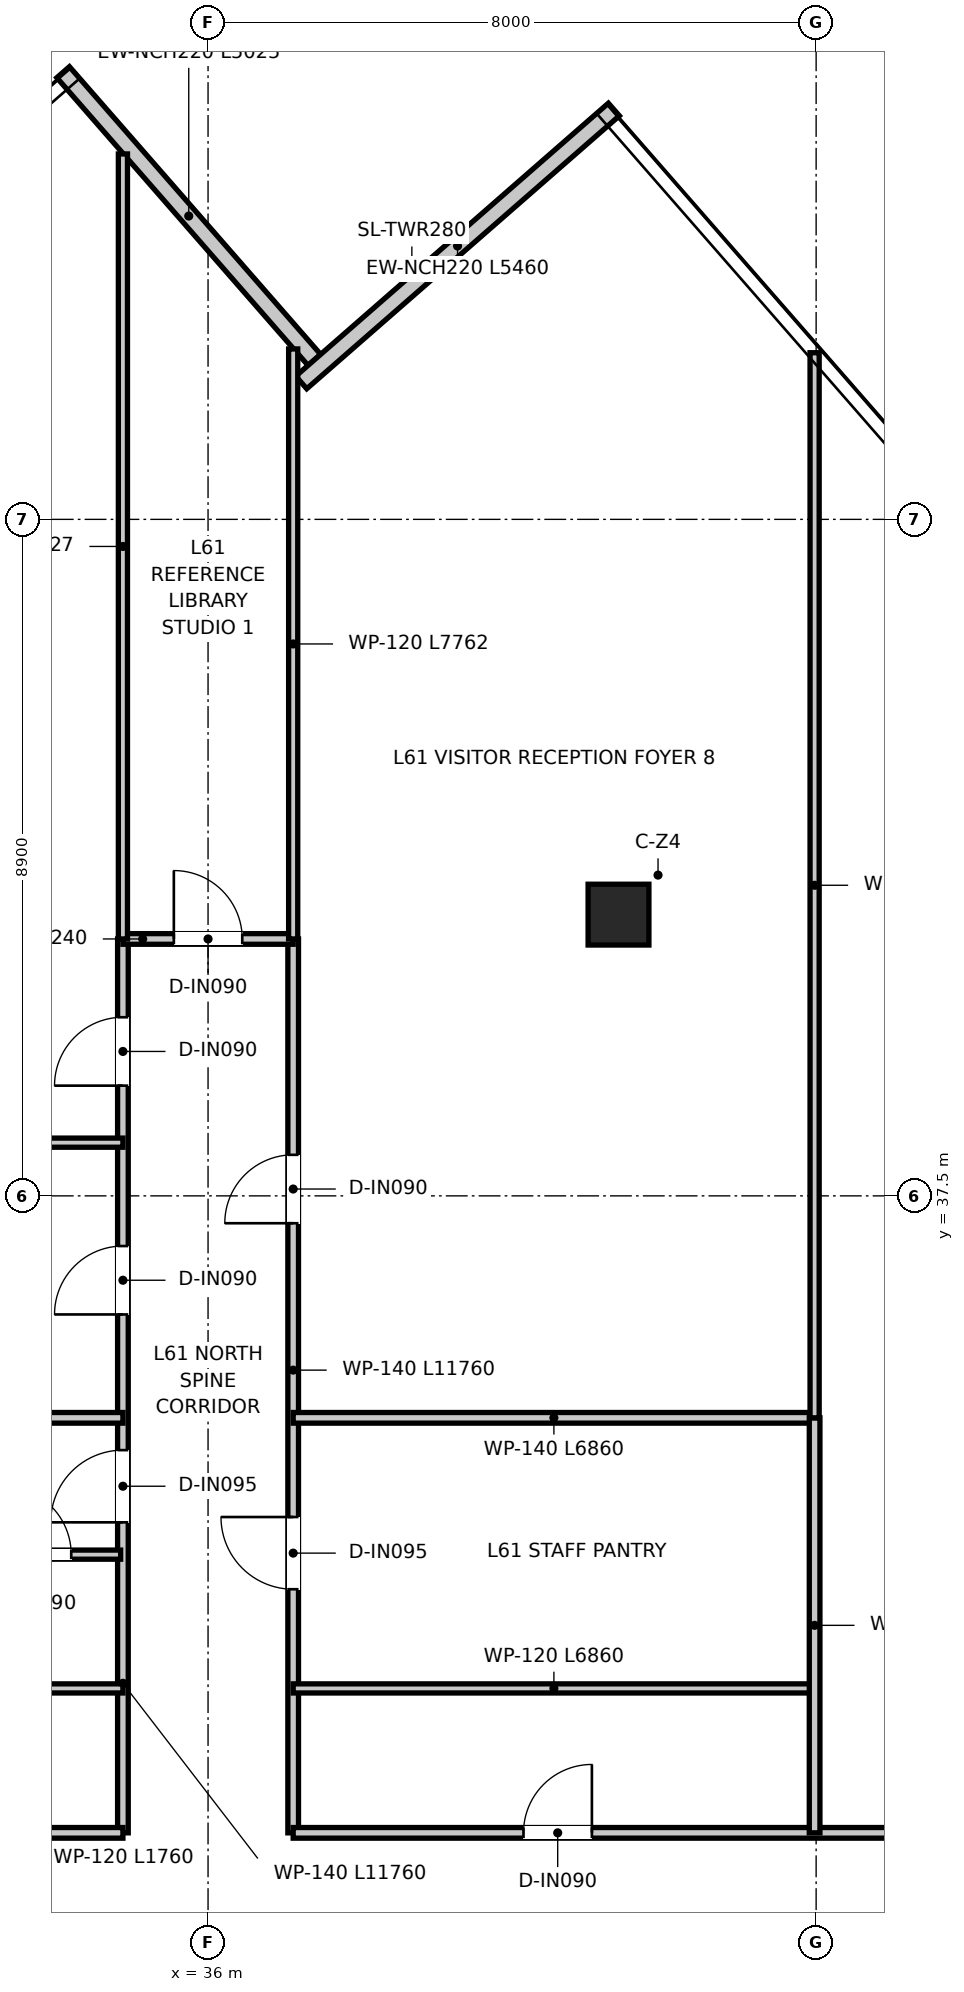
"""IFC4 building model, lengths in metres.
Left out: names, types, materials, properties, quantities, classifications, styles, units other than length and angle.
Written with IfcOpenShell. Run it as: python <this file> out.ifc"""

import sys

from ifc_helpers import new_model, si_unit, direction, frame, frame_2d, origin, origin_2d, place, context, subcontext, project, spatial, rectangle, extrude, source, transform, mapped, element, fill, save


model = new_model("IFC4")
c1 = context("Model", 3, precision=1e-05, world=origin(), true_north=direction((0.0, 1.0)))
c2 = subcontext(c1, "Body", "Model", "MODEL_VIEW")
j1 = project(units=[si_unit("LENGTHUNIT", "METRE"), si_unit("PLANEANGLEUNIT", "RADIAN")], contexts=[c1])
p1 = place(None, origin())
s1 = spatial("IfcSite", under=j1, at=p1, CompositionType="ELEMENT")
p2 = place(p1, origin())
s2 = spatial("IfcBuilding", under=s1, at=p2, CompositionType="ELEMENT")
p3 = place(p2, frame((0.0, 0.0, 250.75)))
s3 = spatial("IfcBuildingStorey", under=s2, at=p3, CompositionType="ELEMENT", Elevation=250.75)
m1 = source(origin(), c2, "Body", "SweptSolid", [
    extrude(rectangle(XDim=0.8, YDim=0.8, at=origin_2d()), origin(), (0.0, 0.0, 1.0), 3.95),
])
p4 = place(p3, frame((41.4, 41.2, 0.0), z_axis=(0.0, 0.0, 1.0), x_axis=(1.0, 0.0, 0.0)))
e1 = element("IfcColumn", 1, at=p4, inside=s3, PredefinedType="COLUMN", context=c2, shape_type="MappedRepresentation", body=[
    mapped(m1, transform((0.0, 0.0, 0.0), x_axis=(1.0, 0.0, 0.0), y_axis=(0.0, 1.0, 0.0), z_axis=(0.0, 0.0, 1.0), scale=1.0)),
])
p5 = place(p3, frame((37.398, 48.498, 0.0), z_axis=(0.0, 0.0, 1.0), x_axis=(-0.657706226339, 0.753274531518, 0.0)))
e2 = element("IfcWall", 2, at=p5, inside=s3, PredefinedType="ELEMENTEDWALL", context=c2, shape_type="SweptSolid", body=[
    extrude(rectangle(XDim=5.025, YDim=0.22, at=frame_2d((2.512, 0.0))), origin(), (0.0, 0.0, 1.0), 3.67),
])
p6 = place(p3, frame((41.339, 51.792, 0.0), z_axis=(0.0, 0.0, 1.0), x_axis=(-0.753268767402, -0.657712827955, 0.0)))
e3 = element("IfcWall", 3, at=p6, inside=s3, PredefinedType="ELEMENTEDWALL", context=c2, shape_type="SweptSolid", body=[
    extrude(rectangle(XDim=5.46, YDim=0.22, at=frame_2d((2.73, 0.0))), origin(), (0.0, 0.0, 1.0), 3.67),
])
p7 = place(p3, frame((34.88, 29.12, 0.0), z_axis=(0.0, 0.0, 1.0), x_axis=(0.0, 1.0, 0.0)))
e4 = element("IfcWall", 4, at=p7, inside=s3, PredefinedType="PARTITIONING", context=c2, shape_type="SweptSolid", body=[
    extrude(rectangle(XDim=11.76, YDim=0.14, at=frame_2d((5.88, 0.0))), origin(), (0.0, 0.0, 1.0), 3.03),
])
p8 = place(p7, frame((4.085, 0.0, 0.0)))
e5 = element("IfcOpeningElement", 5, at=p8, cuts=e4, PredefinedType="OPENING", context=c2, shape_type="SweptSolid", body=[
    extrude(rectangle(XDim=0.95, YDim=2.1, at=frame_2d((0.475, 1.05))), frame((0.0, 0.08, 0.0), z_axis=(0.0, -1.0, 0.0), x_axis=(1.0, 0.0, 0.0)), (0.0, 0.0, 1.0), 0.16),
])
p9 = place(p7, frame((6.82, 0.0, 0.0)))
e6 = element("IfcOpeningElement", 6, at=p9, cuts=e4, PredefinedType="OPENING", context=c2, shape_type="SweptSolid", body=[
    extrude(rectangle(XDim=0.9, YDim=2.1, at=frame_2d((0.45, 1.05))), frame((0.0, 0.08, 0.0), z_axis=(0.0, -1.0, 0.0), x_axis=(1.0, 0.0, 0.0)), (0.0, 0.0, 1.0), 0.16),
])
p10 = place(p7, frame((9.83, 0.0, 0.0)))
e7 = element("IfcOpeningElement", 7, at=p10, cuts=e4, PredefinedType="OPENING", context=c2, shape_type="SweptSolid", body=[
    extrude(rectangle(XDim=0.9, YDim=2.1, at=frame_2d((0.45, 1.05))), frame((0.0, 0.08, 0.0), z_axis=(0.0, -1.0, 0.0), x_axis=(1.0, 0.0, 0.0)), (0.0, 0.0, 1.0), 0.16),
])
p11 = place(p3, frame((37.12, 29.12, 0.0), z_axis=(0.0, 0.0, 1.0), x_axis=(0.0, 1.0, 0.0)))
e8 = element("IfcWall", 8, at=p11, inside=s3, PredefinedType="PARTITIONING", context=c2, shape_type="SweptSolid", body=[
    extrude(rectangle(XDim=11.76, YDim=0.14, at=frame_2d((5.88, 0.0))), origin(), (0.0, 0.0, 1.0), 3.03),
])
p12 = place(p11, frame((3.205, 0.0, 0.0)))
e9 = element("IfcOpeningElement", 9, at=p12, cuts=e8, PredefinedType="OPENING", context=c2, shape_type="SweptSolid", body=[
    extrude(rectangle(XDim=0.95, YDim=2.1, at=frame_2d((0.475, 1.05))), frame((0.0, 0.08, 0.0), z_axis=(0.0, -1.0, 0.0), x_axis=(1.0, 0.0, 0.0)), (0.0, 0.0, 1.0), 0.16),
])
p13 = place(p11, frame((8.02, 0.0, 0.0)))
e10 = element("IfcOpeningElement", 10, at=p13, cuts=e8, PredefinedType="OPENING", context=c2, shape_type="SweptSolid", body=[
    extrude(rectangle(XDim=0.9, YDim=2.1, at=frame_2d((0.45, 1.05))), frame((0.0, 0.08, 0.0), z_axis=(0.0, -1.0, 0.0), x_axis=(1.0, 0.0, 0.0)), (0.0, 0.0, 1.0), 0.16),
])
p14 = place(p3, frame((34.88, 40.88, 0.0), z_axis=(0.0, 0.0, 1.0), x_axis=(1.0, 0.0, 0.0)))
e11 = element("IfcWall", 11, at=p14, inside=s3, PredefinedType="PARTITIONING", context=c2, shape_type="SweptSolid", body=[
    extrude(rectangle(XDim=2.24, YDim=0.14, at=frame_2d((1.12, 0.0))), origin(), (0.0, 0.0, 1.0), 3.67),
])
p15 = place(p14, frame((0.67, 0.0, 0.0)))
e12 = element("IfcOpeningElement", 12, at=p15, cuts=e11, PredefinedType="OPENING", context=c2, shape_type="SweptSolid", body=[
    extrude(rectangle(XDim=0.9, YDim=2.1, at=frame_2d((0.45, 1.05))), frame((0.0, 0.08, 0.0), z_axis=(0.0, -1.0, 0.0), x_axis=(1.0, 0.0, 0.0)), (0.0, 0.0, 1.0), 0.16),
])
p16 = place(p3, frame((13.609, 29.12, 0.0), z_axis=(0.0, 0.0, 1.0), x_axis=(1.0, 0.0, 0.0)))
e13 = element("IfcWall", 13, at=p16, inside=s3, PredefinedType="PARTITIONING", context=c2, shape_type="SweptSolid", body=[
    extrude(rectangle(XDim=21.271, YDim=0.14, at=frame_2d((10.635, 0.0))), origin(), (0.0, 0.0, 1.0), 3.03),
])
p17 = place(p16, frame((17.341, 0.0, 0.0)))
e14 = element("IfcOpeningElement", 14, at=p17, cuts=e13, PredefinedType="OPENING", context=c2, shape_type="SweptSolid", body=[
    extrude(rectangle(XDim=0.9, YDim=2.1, at=frame_2d((0.45, 1.05))), frame((0.0, 0.08, 0.0), z_axis=(0.0, -1.0, 0.0), x_axis=(1.0, 0.0, 0.0)), (0.0, 0.0, 1.0), 0.16),
])
p18 = place(p16, frame((1.478, 0.0, 0.0)))
e15 = element("IfcOpeningElement", 15, at=p18, cuts=e13, PredefinedType="OPENING", context=c2, shape_type="SweptSolid", body=[
    extrude(rectangle(XDim=0.9, YDim=2.1, at=frame_2d((0.45, 1.05))), frame((0.0, 0.08, 0.0), z_axis=(0.0, -1.0, 0.0), x_axis=(1.0, 0.0, 0.0)), (0.0, 0.0, 1.0), 0.16),
])
p19 = place(p16, frame((6.841, 0.0, 0.0)))
e16 = element("IfcOpeningElement", 16, at=p19, cuts=e13, PredefinedType="OPENING", context=c2, shape_type="SweptSolid", body=[
    extrude(rectangle(XDim=0.9, YDim=2.1, at=frame_2d((0.45, 1.05))), frame((0.0, 0.08, 0.0), z_axis=(0.0, -1.0, 0.0), x_axis=(1.0, 0.0, 0.0)), (0.0, 0.0, 1.0), 0.16),
])
p20 = place(p16, frame((9.441, 0.0, 0.0)))
e17 = element("IfcOpeningElement", 17, at=p20, cuts=e13, PredefinedType="OPENING", context=c2, shape_type="SweptSolid", body=[
    extrude(rectangle(XDim=0.9, YDim=2.1, at=frame_2d((0.45, 1.05))), frame((0.0, 0.08, 0.0), z_axis=(0.0, -1.0, 0.0), x_axis=(1.0, 0.0, 0.0)), (0.0, 0.0, 1.0), 0.16),
])
p21 = place(p16, frame((12.141, 0.0, 0.0)))
e18 = element("IfcOpeningElement", 18, at=p21, cuts=e13, PredefinedType="OPENING", context=c2, shape_type="SweptSolid", body=[
    extrude(rectangle(XDim=0.9, YDim=2.1, at=frame_2d((0.45, 1.05))), frame((0.0, 0.08, 0.0), z_axis=(0.0, -1.0, 0.0), x_axis=(1.0, 0.0, 0.0)), (0.0, 0.0, 1.0), 0.16),
])
p22 = place(p3, frame((37.12, 29.12, 0.0), z_axis=(0.0, 0.0, 1.0), x_axis=(1.0, 0.0, 0.0)))
e19 = element("IfcWall", 19, at=p22, inside=s3, PredefinedType="PARTITIONING", context=c2, shape_type="SweptSolid", body=[
    extrude(rectangle(XDim=23.862, YDim=0.14, at=frame_2d((11.931, 0.0))), origin(), (0.0, 0.0, 1.0), 3.03),
])
p23 = place(p22, frame((3.03, 0.0, 0.0)))
e20 = element("IfcOpeningElement", 20, at=p23, cuts=e19, PredefinedType="OPENING", context=c2, shape_type="SweptSolid", body=[
    extrude(rectangle(XDim=0.9, YDim=2.1, at=frame_2d((0.45, 1.05))), frame((0.0, 0.08, 0.0), z_axis=(0.0, -1.0, 0.0), x_axis=(1.0, 0.0, 0.0)), (0.0, 0.0, 1.0), 0.16),
])
p24 = place(p22, frame((8.42, 0.0, 0.0)))
e21 = element("IfcOpeningElement", 21, at=p24, cuts=e19, PredefinedType="OPENING", context=c2, shape_type="SweptSolid", body=[
    extrude(rectangle(XDim=0.9, YDim=2.1, at=frame_2d((0.45, 1.05))), frame((0.0, 0.08, 0.0), z_axis=(0.0, -1.0, 0.0), x_axis=(1.0, 0.0, 0.0)), (0.0, 0.0, 1.0), 0.16),
])
p25 = place(p22, frame((12.03, 0.0, 0.0)))
e22 = element("IfcOpeningElement", 22, at=p25, cuts=e19, PredefinedType="OPENING", context=c2, shape_type="SweptSolid", body=[
    extrude(rectangle(XDim=0.9, YDim=2.1, at=frame_2d((0.45, 1.05))), frame((0.0, 0.08, 0.0), z_axis=(0.0, -1.0, 0.0), x_axis=(1.0, 0.0, 0.0)), (0.0, 0.0, 1.0), 0.16),
])
p26 = place(p22, frame((18.293, 0.0, 0.0)))
e23 = element("IfcOpeningElement", 23, at=p26, cuts=e19, PredefinedType="OPENING", context=c2, shape_type="SweptSolid", body=[
    extrude(rectangle(XDim=0.9, YDim=2.1, at=frame_2d((0.45, 1.05))), frame((0.0, 0.08, 0.0), z_axis=(0.0, -1.0, 0.0), x_axis=(1.0, 0.0, 0.0)), (0.0, 0.0, 1.0), 0.16),
])
for number, where, z_axis, x_axis in (
    (24, (28.02, 31.02, 0.0), (0.0, 0.0, 1.0), (1.0, 0.0, 0.0)),
    (25, (37.12, 31.02, 0.0), (0.0, 0.0, 1.0), (1.0, 0.0, 0.0)),
):
    element("IfcWall", number, at=place(p3, frame(where, z_axis=z_axis, x_axis=x_axis)), inside=s3, PredefinedType="PARTITIONING", context=c2, shape_type="SweptSolid", body=[
        extrude(rectangle(XDim=6.86, YDim=0.12, at=frame_2d((3.43, 0.0))), origin(), (0.0, 0.0, 1.0), 3.18),
    ])
for number, where, z_axis, x_axis in (
    (26, (28.02, 34.58, 0.0), (0.0, 0.0, 1.0), (1.0, 0.0, 0.0)),
    (27, (37.12, 34.58, 0.0), (0.0, 0.0, 1.0), (1.0, 0.0, 0.0)),
):
    element("IfcWall", number, at=place(p3, frame(where, z_axis=z_axis, x_axis=x_axis)), inside=s3, PredefinedType="PARTITIONING", context=c2, shape_type="SweptSolid", body=[
        extrude(rectangle(XDim=6.86, YDim=0.14, at=frame_2d((3.43, 0.0))), origin(), (0.0, 0.0, 1.0), 3.18),
    ])
p27 = place(p3, frame((43.98, 29.12, 0.0), z_axis=(0.0, 0.0, 1.0), x_axis=(0.0, 1.0, 0.0)))
e28 = element("IfcWall", 28, at=p27, inside=s3, PredefinedType="PARTITIONING", context=c2, shape_type="SweptSolid", body=[
    extrude(rectangle(XDim=5.46, YDim=0.14, at=frame_2d((2.73, 0.0))), origin(), (0.0, 0.0, 1.0), 3.37),
])
p28 = place(p3, frame((28.05, 32.78, 0.0), z_axis=(0.0, 0.0, 1.0), x_axis=(1.0, 0.0, 0.0)))
e29 = element("IfcWall", 29, at=p28, inside=s3, PredefinedType="PARTITIONING", context=c2, shape_type="SweptSolid", body=[
    extrude(rectangle(XDim=6.8, YDim=0.12, at=frame_2d((3.4, 0.0))), origin(), (0.0, 0.0, 1.0), 3.18),
])
p29 = place(p28, frame((0.725, 0.0, 0.0)))
e30 = element("IfcOpeningElement", 30, at=p29, cuts=e29, PredefinedType="OPENING", context=c2, shape_type="SweptSolid", body=[
    extrude(rectangle(XDim=0.85, YDim=2.1, at=frame_2d((0.425, 1.05))), frame((0.0, 0.07, 0.0), z_axis=(0.0, -1.0, 0.0), x_axis=(1.0, 0.0, 0.0)), (0.0, 0.0, 1.0), 0.14),
])
p30 = place(p28, frame((3.065, 0.0, 0.0)))
e31 = element("IfcOpeningElement", 31, at=p30, cuts=e29, PredefinedType="OPENING", context=c2, shape_type="SweptSolid", body=[
    extrude(rectangle(XDim=0.85, YDim=2.1, at=frame_2d((0.425, 1.05))), frame((0.0, 0.07, 0.0), z_axis=(0.0, -1.0, 0.0), x_axis=(1.0, 0.0, 0.0)), (0.0, 0.0, 1.0), 0.14),
])
p31 = place(p28, frame((5.25, 0.0, 0.0)))
e32 = element("IfcOpeningElement", 32, at=p31, cuts=e29, PredefinedType="OPENING", context=c2, shape_type="SweptSolid", body=[
    extrude(rectangle(XDim=0.9, YDim=2.1, at=frame_2d((0.45, 1.05))), frame((0.0, 0.07, 0.0), z_axis=(0.0, -1.0, 0.0), x_axis=(1.0, 0.0, 0.0)), (0.0, 0.0, 1.0), 0.14),
])
p32 = place(p3, frame((34.88, 40.88, 0.0), z_axis=(0.0, 0.0, 1.0), x_axis=(0.0, 1.0, 0.0)))
e33 = element("IfcWall", 33, at=p32, inside=s3, PredefinedType="PARTITIONING", context=c2, shape_type="SweptSolid", body=[
    extrude(rectangle(XDim=10.328, YDim=0.12, at=frame_2d((5.164, 0.0))), origin(), (0.0, 0.0, 1.0), 3.28),
])
p33 = place(p3, frame((37.12, 40.88, 0.0), z_axis=(0.0, 0.0, 1.0), x_axis=(0.0, 1.0, 0.0)))
e34 = element("IfcWall", 34, at=p33, inside=s3, PredefinedType="PARTITIONING", context=c2, shape_type="SweptSolid", body=[
    extrude(rectangle(XDim=7.762, YDim=0.12, at=frame_2d((3.881, 0.0))), origin(), (0.0, 0.0, 1.0), 3.28),
])
p34 = place(p3, frame((43.98, 34.58, 0.0), z_axis=(0.0, 0.0, 1.0), x_axis=(0.0, 1.0, 0.0)))
e35 = element("IfcWall", 35, at=p34, inside=s3, PredefinedType="PARTITIONING", context=c2, shape_type="SweptSolid", body=[
    extrude(rectangle(XDim=14.012, YDim=0.12, at=frame_2d((7.006, 0.0))), origin(), (0.0, 0.0, 1.0), 3.03),
])
p35 = place(p3, frame((28.02, 38.2, 0.0), z_axis=(0.0, 0.0, 1.0), x_axis=(1.0, 0.0, 0.0)))
e36 = element("IfcWall", 36, at=p35, inside=s3, PredefinedType="PARTITIONING", context=c2, shape_type="SweptSolid", body=[
    extrude(rectangle(XDim=6.86, YDim=0.12, at=frame_2d((3.43, 0.0))), origin(), (0.0, 0.0, 1.0), 3.18),
])
p36 = place(p23, origin())
e37 = element("IfcDoor", 37, at=p36, inside=s3, OperationType="SINGLE_SWING_RIGHT", PredefinedType="DOOR", context=c2, shape_type="SweptSolid", body=[
    extrude(rectangle(XDim=0.9, YDim=2.1, at=frame_2d((0.45, 1.05))), frame((0.0, 0.025, 0.0), z_axis=(0.0, -1.0, 0.0), x_axis=(1.0, 0.0, 0.0)), (0.0, 0.0, 1.0), 0.05),
])
fill(e20, e37)
p37 = place(p8, origin())
e38 = element("IfcDoor", 38, at=p37, inside=s3, OperationType="SINGLE_SWING_LEFT", PredefinedType="DOOR", context=c2, shape_type="SweptSolid", body=[
    extrude(rectangle(XDim=0.95, YDim=2.1, at=frame_2d((0.475, 1.05))), frame((0.0, 0.025, 0.0), z_axis=(0.0, -1.0, 0.0), x_axis=(1.0, 0.0, 0.0)), (0.0, 0.0, 1.0), 0.05),
])
fill(e5, e38)
p38 = place(p12, origin())
e39 = element("IfcDoor", 39, at=p38, inside=s3, OperationType="SINGLE_SWING_RIGHT", PredefinedType="DOOR", context=c2, shape_type="SweptSolid", body=[
    extrude(rectangle(XDim=0.95, YDim=2.1, at=frame_2d((0.475, 1.05))), frame((0.0, 0.025, 0.0), z_axis=(0.0, -1.0, 0.0), x_axis=(1.0, 0.0, 0.0)), (0.0, 0.0, 1.0), 0.05),
])
fill(e9, e39)
p39 = place(p31, origin())
e40 = element("IfcDoor", 40, at=p39, inside=s3, OperationType="SINGLE_SWING_LEFT", PredefinedType="DOOR", context=c2, shape_type="SweptSolid", body=[
    extrude(rectangle(XDim=0.9, YDim=2.1, at=frame_2d((0.45, 1.05))), frame((0.0, 0.025, 0.0), z_axis=(0.0, -1.0, 0.0), x_axis=(1.0, 0.0, 0.0)), (0.0, 0.0, 1.0), 0.05),
])
fill(e32, e40)
p40 = place(p15, origin())
e41 = element("IfcDoor", 41, at=p40, inside=s3, OperationType="SINGLE_SWING_LEFT", PredefinedType="DOOR", context=c2, shape_type="SweptSolid", body=[
    extrude(rectangle(XDim=0.9, YDim=2.1, at=frame_2d((0.45, 1.05))), frame((0.0, 0.025, 0.0), z_axis=(0.0, -1.0, 0.0), x_axis=(1.0, 0.0, 0.0)), (0.0, 0.0, 1.0), 0.05),
])
fill(e12, e41)
p41 = place(p9, origin())
e42 = element("IfcDoor", 42, at=p41, inside=s3, OperationType="SINGLE_SWING_LEFT", PredefinedType="DOOR", context=c2, shape_type="SweptSolid", body=[
    extrude(rectangle(XDim=0.9, YDim=2.1, at=frame_2d((0.45, 1.05))), frame((0.0, 0.025, 0.0), z_axis=(0.0, -1.0, 0.0), x_axis=(1.0, 0.0, 0.0)), (0.0, 0.0, 1.0), 0.05),
])
fill(e6, e42)
p42 = place(p10, origin())
e43 = element("IfcDoor", 43, at=p42, inside=s3, OperationType="SINGLE_SWING_LEFT", PredefinedType="DOOR", context=c2, shape_type="SweptSolid", body=[
    extrude(rectangle(XDim=0.9, YDim=2.1, at=frame_2d((0.45, 1.05))), frame((0.0, 0.025, 0.0), z_axis=(0.0, -1.0, 0.0), x_axis=(1.0, 0.0, 0.0)), (0.0, 0.0, 1.0), 0.05),
])
fill(e7, e43)
p43 = place(p13, origin())
e44 = element("IfcDoor", 44, at=p43, inside=s3, OperationType="SINGLE_SWING_LEFT", PredefinedType="DOOR", context=c2, shape_type="SweptSolid", body=[
    extrude(rectangle(XDim=0.9, YDim=2.1, at=frame_2d((0.45, 1.05))), frame((0.0, 0.025, 0.0), z_axis=(0.0, -1.0, 0.0), x_axis=(1.0, 0.0, 0.0)), (0.0, 0.0, 1.0), 0.05),
])
fill(e10, e44)
save(model, sys.argv[1])
